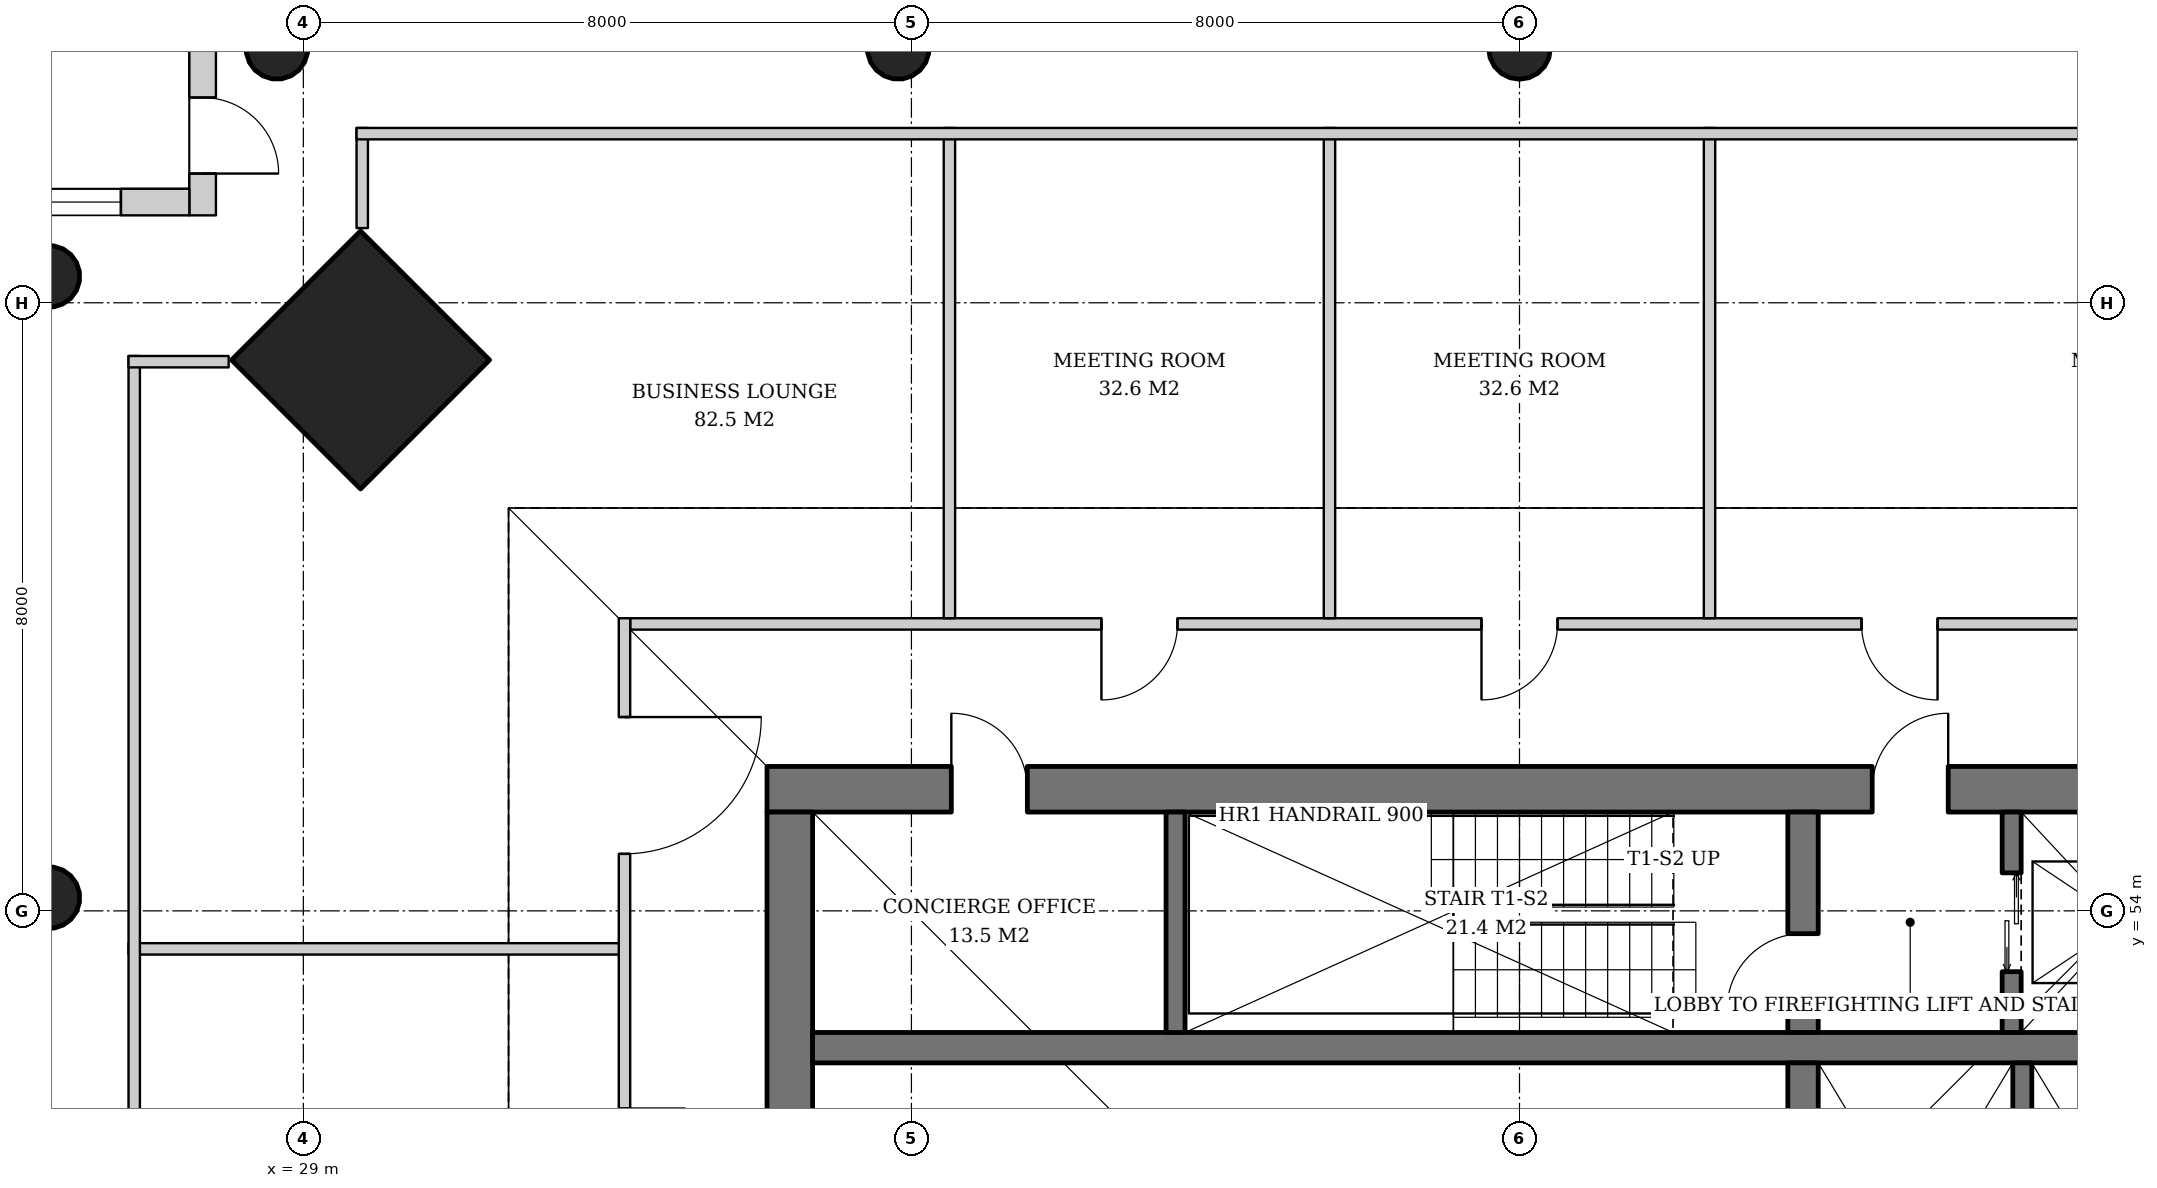
"""IFC4 building model, lengths in metres.
Left out: names, types, materials, properties, quantities, classifications, styles, units other than length and angle.
Written with IfcOpenShell. Run it as: python <this file> out.ifc"""

import sys

from ifc_helpers import new_model, si_unit, direction, frame, frame_2d, origin, origin_2d, place, context, subcontext, project, spatial, rectangle, hollow_circle, extrude, element, fill, save


model = new_model("IFC4")
c1 = context("Model", 3, precision=1e-05, world=origin(), true_north=direction((0.0, 1.0)))
c2 = subcontext(c1, "Body", "Model", "MODEL_VIEW")
j1 = project(units=[si_unit("LENGTHUNIT", "METRE"), si_unit("PLANEANGLEUNIT", "RADIAN")], contexts=[c1])
p1 = place(None, origin())
s1 = spatial("IfcSite", under=j1, at=p1, CompositionType="ELEMENT")
p2 = place(p1, origin())
s2 = spatial("IfcBuilding", under=s1, at=p2, CompositionType="ELEMENT")
p3 = place(p2, frame((0.0, 0.0, 165.4)))
s3 = spatial("IfcBuildingStorey", under=s2, at=p3, CompositionType="ELEMENT", Elevation=165.4)
p4 = place(p3, frame((29.714, 61.286, 0.0), z_axis=(0.031898107953, -0.031898107953, 0.998981992539), x_axis=(0.707106781187, 0.707106781187, 0.0)))
e1 = element("IfcColumn", 1, at=p4, inside=s3, PredefinedType="COLUMN", context=c2, shape_type="SweptSolid", body=[
    extrude(rectangle(XDim=2.4, YDim=2.4, at=origin_2d()), origin(), (0.0, 0.0, 1.0), 3.804),
])
p5 = place(p3, frame((28.614, 65.386, 0.0), z_axis=(0.031898107953, -0.031898107953, 0.998981992539), x_axis=(0.707106781187, 0.707106781187, 0.0)))
e2 = element("IfcColumn", 2, at=p5, inside=s3, PredefinedType="COLUMN", context=c2, shape_type="SweptSolid", body=[
    extrude(hollow_circle(Radius=0.406, WallThickness=0.03, at=origin_2d()), origin(), (0.0, 0.0, 1.0), 3.804),
])
p6 = place(p3, frame((45.0, 65.386, 0.0), z_axis=(0.0, -0.031914348339, 0.999490607445), x_axis=(1.0, 0.0, 0.0)))
e3 = element("IfcColumn", 3, at=p6, inside=s3, PredefinedType="COLUMN", context=c2, shape_type="SweptSolid", body=[
    extrude(hollow_circle(Radius=0.406, WallThickness=0.03, at=origin_2d()), origin(), (0.0, 0.0, 1.0), 3.802),
])
p7 = place(p3, frame((36.807, 65.386, 0.0), z_axis=(0.015987237665, -0.031910269556, 0.999362868496), x_axis=(0.894067115991, 0.447933021895, 0.0)))
e4 = element("IfcColumn", 4, at=p7, inside=s3, PredefinedType="COLUMN", context=c2, shape_type="SweptSolid", body=[
    extrude(hollow_circle(Radius=0.406, WallThickness=0.03, at=origin_2d()), origin(), (0.0, 0.0, 1.0), 3.802),
])
p8 = place(p3, frame((25.614, 62.386, 0.0), z_axis=(0.031898107953, -0.031898107953, 0.998981992539), x_axis=(0.707106781187, 0.707106781187, 0.0)))
e5 = element("IfcColumn", 5, at=p8, inside=s3, PredefinedType="COLUMN", context=c2, shape_type="SweptSolid", body=[
    extrude(hollow_circle(Radius=0.406, WallThickness=0.03, at=origin_2d()), origin(), (0.0, 0.0, 1.0), 3.804),
])
p9 = place(p3, frame((25.614, 54.193, 0.0), z_axis=(0.031910269556, -0.015987237665, 0.999362868496), x_axis=(0.447933021895, 0.894067115991, 0.0)))
e6 = element("IfcColumn", 6, at=p9, inside=s3, PredefinedType="COLUMN", context=c2, shape_type="SweptSolid", body=[
    extrude(hollow_circle(Radius=0.406, WallThickness=0.03, at=origin_2d()), origin(), (0.0, 0.0, 1.0), 3.802),
])
p10 = place(p3, frame((35.1, 55.6, 0.0), z_axis=(0.0, 0.0, 1.0), x_axis=(1.0, 0.0, 0.0)))
e7 = element("IfcWall", 7, at=p10, inside=s3, PredefinedType="SHEAR", context=c2, shape_type="SweptSolid", body=[
    extrude(rectangle(XDim=19.8, YDim=0.6, at=frame_2d((9.9, 0.0))), origin(), (0.0, 0.0, 1.0), 3.8),
])
p11 = place(p10, frame((14.54, 0.0, 0.0)))
e8 = element("IfcOpeningElement", 8, at=p11, cuts=e7, PredefinedType="OPENING", context=c2, shape_type="SweptSolid", body=[
    extrude(rectangle(XDim=1.0, YDim=2.1, at=frame_2d((0.5, 1.05))), frame((0.0, 0.31, 0.0), z_axis=(0.0, -1.0, 0.0), x_axis=(1.0, 0.0, 0.0)), (0.0, 0.0, 1.0), 0.62),
])
p12 = place(p10, frame((2.425, 0.0, 0.0)))
e9 = element("IfcOpeningElement", 9, at=p12, cuts=e7, PredefinedType="OPENING", context=c2, shape_type="SweptSolid", body=[
    extrude(rectangle(XDim=1.0, YDim=2.1, at=frame_2d((0.5, 1.05))), frame((0.0, 0.31, 0.0), z_axis=(0.0, -1.0, 0.0), x_axis=(1.0, 0.0, 0.0)), (0.0, 0.0, 1.0), 0.62),
])
p13 = place(p3, frame((35.4, 36.7, 0.0), z_axis=(0.0, 0.0, 1.0), x_axis=(0.0, 1.0, 0.0)))
e10 = element("IfcWall", 10, at=p13, inside=s3, PredefinedType="SHEAR", context=c2, shape_type="SweptSolid", body=[
    extrude(rectangle(XDim=18.6, YDim=0.6, at=frame_2d((9.3, 0.0))), origin(), (0.0, 0.0, 1.0), 3.8),
])
p14 = place(p13, frame((8.4, 0.0, 0.0)))
e11 = element("IfcOpeningElement", 11, at=p14, cuts=e10, PredefinedType="OPENING", context=c2, shape_type="SweptSolid", body=[
    extrude(rectangle(XDim=1.8, YDim=2.4, at=frame_2d((0.9, 1.2))), frame((0.0, 0.31, 0.0), z_axis=(0.0, -1.0, 0.0), x_axis=(1.0, 0.0, 0.0)), (0.0, 0.0, 1.0), 0.62),
])
p15 = place(p3, frame((35.7, 52.2, 0.0), z_axis=(0.0, 0.0, 1.0), x_axis=(1.0, 0.0, 0.0)))
e12 = element("IfcWall", 12, at=p15, inside=s3, PredefinedType="SHEAR", context=c2, shape_type="SweptSolid", body=[
    extrude(rectangle(XDim=18.6, YDim=0.4, at=frame_2d((9.3, 0.0))), origin(), (0.0, 0.0, 1.0), 3.8),
])
p16 = place(p3, frame((48.73, 40.0, 0.0), z_axis=(0.0, 0.0, 1.0), x_axis=(0.0, 1.0, 0.0)))
e13 = element("IfcWall", 13, at=p16, inside=s3, PredefinedType="SHEAR", context=c2, shape_type="SweptSolid", body=[
    extrude(rectangle(XDim=12.0, YDim=0.4, at=frame_2d((6.0, 0.0))), origin(), (0.0, 0.0, 1.0), 3.8),
])
p17 = place(p3, frame((48.73, 52.4, 0.0), z_axis=(0.0, 0.0, 1.0), x_axis=(0.0, 1.0, 0.0)))
e14 = element("IfcWall", 14, at=p17, inside=s3, PredefinedType="SHEAR", context=c2, shape_type="SweptSolid", body=[
    extrude(rectangle(XDim=2.9, YDim=0.4, at=frame_2d((1.45, 0.0))), origin(), (0.0, 0.0, 1.0), 3.8),
])
p18 = place(p17, frame((0.3, 0.0, 0.0)))
e15 = element("IfcOpeningElement", 15, at=p18, cuts=e14, PredefinedType="OPENING", context=c2, shape_type="SweptSolid", body=[
    extrude(rectangle(XDim=1.0, YDim=2.1, at=frame_2d((0.5, 1.05))), frame((0.0, 0.21, 0.0), z_axis=(0.0, -1.0, 0.0), x_axis=(1.0, 0.0, 0.0)), (0.0, 0.0, 1.0), 0.42),
])
p19 = place(p3, frame((27.675, 66.5, 0.0), z_axis=(0.0, 0.0, 1.0), x_axis=(0.0, -1.0, 0.0)))
e16 = element("IfcWall", 16, at=p19, inside=s3, PredefinedType="SOLIDWALL", context=c2, shape_type="SweptSolid", body=[
    extrude(rectangle(XDim=3.35, YDim=0.35, at=frame_2d((1.675, 0.0))), origin(), (0.0, 0.0, 1.0), 3.62),
])
p20 = place(p19, frame((1.8, 0.0, 0.0)))
e17 = element("IfcOpeningElement", 17, at=p20, cuts=e16, PredefinedType="OPENING", context=c2, shape_type="SweptSolid", body=[
    extrude(rectangle(XDim=1.0, YDim=2.4, at=frame_2d((0.5, 1.2))), frame((0.0, 0.185, 0.0), z_axis=(0.0, -1.0, 0.0), x_axis=(1.0, 0.0, 0.0)), (0.0, 0.0, 1.0), 0.37),
])
p21 = place(p3, frame((27.5, 63.325, 0.0), z_axis=(0.0, 0.0, 1.0), x_axis=(-1.0, 0.0, 0.0)))
e18 = element("IfcWall", 18, at=p21, inside=s3, PredefinedType="SOLIDWALL", context=c2, shape_type="SweptSolid", body=[
    extrude(rectangle(XDim=3.0, YDim=0.35, at=frame_2d((1.5, 0.0))), origin(), (0.0, 0.0, 1.0), 3.62),
])
p22 = place(p21, frame((0.9, 0.0, 0.6)))
e19 = element("IfcOpeningElement", 19, at=p22, cuts=e18, PredefinedType="OPENING", context=c2, shape_type="SweptSolid", body=[
    extrude(rectangle(XDim=1.2, YDim=2.55, at=frame_2d((0.6, 1.275))), frame((0.0, 0.185, 0.0), z_axis=(0.0, -1.0, 0.0), x_axis=(1.0, 0.0, 0.0)), (0.0, 0.0, 1.0), 0.37),
])
p23 = place(p3, frame((40.475, 52.4, 0.0), z_axis=(0.0, 0.0, 1.0), x_axis=(0.0, 1.0, 0.0)))
e20 = element("IfcWall", 20, at=p23, inside=s3, PredefinedType="SHEAR", context=c2, shape_type="SweptSolid", body=[
    extrude(rectangle(XDim=2.9, YDim=0.25, at=frame_2d((1.45, 0.0))), origin(), (0.0, 0.0, 1.0), 3.8),
])
p24 = place(p3, frame((51.475, 52.4, 0.0), z_axis=(0.0, 0.0, 1.0), x_axis=(0.0, 1.0, 0.0)))
e21 = element("IfcWall", 21, at=p24, inside=s3, PredefinedType="SHEAR", context=c2, shape_type="SweptSolid", body=[
    extrude(rectangle(XDim=2.9, YDim=0.25, at=frame_2d((1.45, 0.0))), origin(), (0.0, 0.0, 1.0), 3.8),
])
p25 = place(p24, frame((0.8, 0.0, 0.0)))
e22 = element("IfcOpeningElement", 22, at=p25, cuts=e21, PredefinedType="OPENING", context=c2, shape_type="SweptSolid", body=[
    extrude(rectangle(XDim=1.3, YDim=2.2, at=frame_2d((0.65, 1.1))), frame((0.0, 0.135, 0.0), z_axis=(0.0, -1.0, 0.0), x_axis=(1.0, 0.0, 0.0)), (0.0, 0.0, 1.0), 0.27),
])
p26 = place(p3, frame((51.615, 47.75, 0.0), z_axis=(0.0, 0.0, 1.0), x_axis=(0.0, 1.0, 0.0)))
e23 = element("IfcWall", 23, at=p26, inside=s3, PredefinedType="SHEAR", context=c2, shape_type="SweptSolid", body=[
    extrude(rectangle(XDim=4.25, YDim=0.25, at=frame_2d((2.125, 0.0))), origin(), (0.0, 0.0, 1.0), 3.8),
])
p27 = place(p3, frame((56.85, 57.775, 0.0), z_axis=(0.0, 0.0, 1.0), x_axis=(-1.0, 0.0, 0.0)))
e24 = element("IfcWall", 24, at=p27, inside=s3, PredefinedType="PARTITIONING", context=c2, shape_type="SweptSolid", body=[
    extrude(rectangle(XDim=23.55, YDim=0.15, at=frame_2d((11.775, 0.0))), origin(), (0.0, 0.0, 1.0), 2.85),
])
p28 = place(p27, frame((6.35, 0.0, 0.0)))
e25 = element("IfcOpeningElement", 25, at=p28, cuts=e24, PredefinedType="OPENING", context=c2, shape_type="SweptSolid", body=[
    extrude(rectangle(XDim=1.0, YDim=2.1, at=frame_2d((0.5, 1.05))), frame((0.0, 0.085, 0.0), z_axis=(0.0, -1.0, 0.0), x_axis=(1.0, 0.0, 0.0)), (0.0, 0.0, 1.0), 0.17),
])
p29 = place(p27, frame((11.35, 0.0, 0.0)))
e26 = element("IfcOpeningElement", 26, at=p29, cuts=e24, PredefinedType="OPENING", context=c2, shape_type="SweptSolid", body=[
    extrude(rectangle(XDim=1.0, YDim=2.1, at=frame_2d((0.5, 1.05))), frame((0.0, 0.085, 0.0), z_axis=(0.0, -1.0, 0.0), x_axis=(1.0, 0.0, 0.0)), (0.0, 0.0, 1.0), 0.17),
])
p30 = place(p27, frame((16.35, 0.0, 0.0)))
e27 = element("IfcOpeningElement", 27, at=p30, cuts=e24, PredefinedType="OPENING", context=c2, shape_type="SweptSolid", body=[
    extrude(rectangle(XDim=1.0, YDim=2.1, at=frame_2d((0.5, 1.05))), frame((0.0, 0.085, 0.0), z_axis=(0.0, -1.0, 0.0), x_axis=(1.0, 0.0, 0.0)), (0.0, 0.0, 1.0), 0.17),
])
for number, where, z_axis, x_axis in (
    (28, (47.5, 57.85, 0.0), (0.0, 0.0, 1.0), (0.0, 1.0, 0.0)),
    (29, (42.5, 57.85, 0.0), (0.0, 0.0, 1.0), (0.0, 1.0, 0.0)),
    (30, (37.5, 57.85, 0.0), (0.0, 0.0, 1.0), (0.0, 1.0, 0.0)),
):
    element("IfcWall", number, at=place(p3, frame(where, z_axis=z_axis, x_axis=x_axis)), inside=s3, PredefinedType="PARTITIONING", context=c2, shape_type="SweptSolid", body=[
        extrude(rectangle(XDim=6.45, YDim=0.15, at=frame_2d((3.225, 0.0))), origin(), (0.0, 0.0, 1.0), 3.62),
    ])
p31 = place(p3, frame((33.225, 57.85, 0.0), z_axis=(0.0, 0.0, 1.0), x_axis=(0.0, -1.0, 0.0)))
e31 = element("IfcWall", 31, at=p31, inside=s3, PredefinedType="PARTITIONING", context=c2, shape_type="SweptSolid", body=[
    extrude(rectangle(XDim=23.55, YDim=0.15, at=frame_2d((11.775, 0.0))), origin(), (0.0, 0.0, 1.0), 2.85),
])
p32 = place(p31, frame((6.45, 0.0, 0.0)))
e32 = element("IfcOpeningElement", 32, at=p32, cuts=e31, PredefinedType="OPENING", context=c2, shape_type="SweptSolid", body=[
    extrude(rectangle(XDim=0.8, YDim=2.1, at=frame_2d((0.4, 1.05))), frame((0.0, 0.085, 0.0), z_axis=(0.0, -1.0, 0.0), x_axis=(1.0, 0.0, 0.0)), (0.0, 0.0, 1.0), 0.17),
])
p33 = place(p31, frame((11.35, 0.0, 0.0)))
e33 = element("IfcOpeningElement", 33, at=p33, cuts=e31, PredefinedType="OPENING", context=c2, shape_type="SweptSolid", body=[
    extrude(rectangle(XDim=1.0, YDim=2.1, at=frame_2d((0.5, 1.05))), frame((0.0, 0.085, 0.0), z_axis=(0.0, -1.0, 0.0), x_axis=(1.0, 0.0, 0.0)), (0.0, 0.0, 1.0), 0.17),
])
p34 = place(p31, frame((16.45, 0.0, 0.0)))
e34 = element("IfcOpeningElement", 34, at=p34, cuts=e31, PredefinedType="OPENING", context=c2, shape_type="SweptSolid", body=[
    extrude(rectangle(XDim=0.8, YDim=2.1, at=frame_2d((0.4, 1.05))), frame((0.0, 0.085, 0.0), z_axis=(0.0, -1.0, 0.0), x_axis=(1.0, 0.0, 0.0)), (0.0, 0.0, 1.0), 0.17),
])
p35 = place(p31, frame((1.3, 0.0, 0.0)))
e35 = element("IfcOpeningElement", 35, at=p35, cuts=e31, PredefinedType="OPENING", context=c2, shape_type="SweptSolid", body=[
    extrude(rectangle(XDim=1.8, YDim=2.4, at=frame_2d((0.9, 1.2))), frame((0.0, 0.085, 0.0), z_axis=(0.0, -1.0, 0.0), x_axis=(1.0, 0.0, 0.0)), (0.0, 0.0, 1.0), 0.17),
])
p36 = place(p3, frame((33.15, 53.5, 0.0), z_axis=(0.0, 0.0, 1.0), x_axis=(-1.0, 0.0, 0.0)))
e36 = element("IfcWall", 36, at=p36, inside=s3, PredefinedType="PARTITIONING", context=c2, shape_type="SweptSolid", body=[
    extrude(rectangle(XDim=6.45, YDim=0.15, at=frame_2d((3.225, 0.0))), origin(), (0.0, 0.0, 1.0), 3.62),
])
p37 = place(p3, frame((26.775, 30.7, 0.0), z_axis=(0.0, 0.0, 1.0), x_axis=(0.0, 1.0, 0.0)))
e37 = element("IfcWall", 37, at=p37, inside=s3, PredefinedType="PARTITIONING", context=c2, shape_type="SweptSolid", body=[
    extrude(rectangle(XDim=30.6, YDim=0.15, at=frame_2d((15.3, 0.0))), origin(), (0.0, 0.0, 1.0), 2.85),
])
for number, where, z_axis, x_axis in (
    (38, (26.7, 61.225, 0.0), (0.0, 0.0, 1.0), (1.0, 0.0, 0.0)),
    (39, (29.775, 62.983, 0.0), (0.0, 0.0, 1.0), (0.0, 1.0, 0.0)),
):
    element("IfcWall", number, at=place(p3, frame(where, z_axis=z_axis, x_axis=x_axis)), inside=s3, PredefinedType="PARTITIONING", context=c2, shape_type="SweptSolid", body=[
        extrude(rectangle(XDim=1.317, YDim=0.15, at=frame_2d((0.659, 0.0))), origin(), (0.0, 0.0, 1.0), 3.62),
    ])
p38 = place(p3, frame((29.7, 64.225, 0.0), z_axis=(0.0, 0.0, 1.0), x_axis=(1.0, 0.0, 0.0)))
e40 = element("IfcWall", 40, at=p38, inside=s3, PredefinedType="PARTITIONING", context=c2, shape_type="SweptSolid", body=[
    extrude(rectangle(XDim=30.6, YDim=0.15, at=frame_2d((15.3, 0.0))), origin(), (0.0, 0.0, 1.0), 2.85),
])
p39 = place(p20, origin())
e41 = element("IfcDoor", 41, at=p39, inside=s3, OperationType="SINGLE_SWING_RIGHT", PredefinedType="DOOR", context=c2, shape_type="SweptSolid", body=[
    extrude(rectangle(XDim=1.0, YDim=2.4, at=frame_2d((0.5, 1.2))), frame((0.0, 0.025, 0.0), z_axis=(0.0, -1.0, 0.0), x_axis=(1.0, 0.0, 0.0)), (0.0, 0.0, 1.0), 0.05),
])
fill(e17, e41)
p40 = place(p22, origin())
e42 = element("IfcWindow", 42, at=p40, inside=s3, PartitioningType="SINGLE_PANEL", PredefinedType="WINDOW", context=c2, shape_type="SweptSolid", body=[
    extrude(rectangle(XDim=1.2, YDim=2.55, at=frame_2d((0.6, 1.275))), frame((0.0, 0.03, 0.0), z_axis=(0.0, -1.0, 0.0), x_axis=(1.0, 0.0, 0.0)), (0.0, 0.0, 1.0), 0.06),
])
fill(e19, e42)
p41 = place(p25, origin())
e43 = element("IfcDoor", 43, at=p41, inside=s3, OperationType="DOUBLE_DOOR_SLIDING", PredefinedType="DOOR", context=c2, shape_type="SweptSolid", body=[
    extrude(rectangle(XDim=1.3, YDim=2.2, at=frame_2d((0.65, 1.1))), frame((0.0, 0.025, 0.0), z_axis=(0.0, -1.0, 0.0), x_axis=(1.0, 0.0, 0.0)), (0.0, 0.0, 1.0), 0.05),
])
fill(e22, e43)
p42 = place(p18, origin())
e44 = element("IfcDoor", 44, at=p42, inside=s3, OperationType="SINGLE_SWING_LEFT", PredefinedType="DOOR", context=c2, shape_type="SweptSolid", body=[
    extrude(rectangle(XDim=1.0, YDim=2.1, at=frame_2d((0.5, 1.05))), frame((0.0, 0.025, 0.0), z_axis=(0.0, -1.0, 0.0), x_axis=(1.0, 0.0, 0.0)), (0.0, 0.0, 1.0), 0.05),
])
fill(e15, e44)
p43 = place(p11, origin())
e45 = element("IfcDoor", 45, at=p43, inside=s3, OperationType="SINGLE_SWING_RIGHT", PredefinedType="DOOR", context=c2, shape_type="SweptSolid", body=[
    extrude(rectangle(XDim=1.0, YDim=2.1, at=frame_2d((0.5, 1.05))), frame((0.0, 0.025, 0.0), z_axis=(0.0, -1.0, 0.0), x_axis=(1.0, 0.0, 0.0)), (0.0, 0.0, 1.0), 0.05),
])
fill(e8, e45)
p44 = place(p12, origin())
e46 = element("IfcDoor", 46, at=p44, inside=s3, OperationType="SINGLE_SWING_LEFT", PredefinedType="DOOR", context=c2, shape_type="SweptSolid", body=[
    extrude(rectangle(XDim=1.0, YDim=2.1, at=frame_2d((0.5, 1.05))), frame((0.0, -0.24, 0.0), z_axis=(0.0, -1.0, 0.0), x_axis=(1.0, 0.0, 0.0)), (0.0, 0.0, 1.0), 0.05),
])
fill(e9, e46)
p45 = place(p28, origin())
e47 = element("IfcDoor", 47, at=p45, inside=s3, OperationType="SINGLE_SWING_LEFT", PredefinedType="DOOR", context=c2, shape_type="SweptSolid", body=[
    extrude(rectangle(XDim=1.0, YDim=2.1, at=frame_2d((0.5, 1.05))), frame((0.0, 0.025, 0.0), z_axis=(0.0, -1.0, 0.0), x_axis=(1.0, 0.0, 0.0)), (0.0, 0.0, 1.0), 0.05),
])
fill(e25, e47)
p46 = place(p29, origin())
e48 = element("IfcDoor", 48, at=p46, inside=s3, OperationType="SINGLE_SWING_RIGHT", PredefinedType="DOOR", context=c2, shape_type="SweptSolid", body=[
    extrude(rectangle(XDim=1.0, YDim=2.1, at=frame_2d((0.5, 1.05))), frame((0.0, 0.025, 0.0), z_axis=(0.0, -1.0, 0.0), x_axis=(1.0, 0.0, 0.0)), (0.0, 0.0, 1.0), 0.05),
])
fill(e26, e48)
p47 = place(p30, origin())
e49 = element("IfcDoor", 49, at=p47, inside=s3, OperationType="SINGLE_SWING_RIGHT", PredefinedType="DOOR", context=c2, shape_type="SweptSolid", body=[
    extrude(rectangle(XDim=1.0, YDim=2.1, at=frame_2d((0.5, 1.05))), frame((0.0, 0.025, 0.0), z_axis=(0.0, -1.0, 0.0), x_axis=(1.0, 0.0, 0.0)), (0.0, 0.0, 1.0), 0.05),
])
fill(e27, e49)
p48 = place(p32, origin())
e50 = element("IfcDoor", 50, at=p48, inside=s3, OperationType="SINGLE_SWING_LEFT", PredefinedType="DOOR", context=c2, shape_type="SweptSolid", body=[
    extrude(rectangle(XDim=0.8, YDim=2.1, at=frame_2d((0.4, 1.05))), frame((0.0, 0.025, 0.0), z_axis=(0.0, -1.0, 0.0), x_axis=(1.0, 0.0, 0.0)), (0.0, 0.0, 1.0), 0.05),
])
fill(e32, e50)
p49 = place(p35, origin())
e51 = element("IfcDoor", 51, at=p49, inside=s3, OperationType="DOUBLE_DOOR_SINGLE_SWING", PredefinedType="DOOR", context=c2, shape_type="SweptSolid", body=[
    extrude(rectangle(XDim=1.8, YDim=2.4, at=frame_2d((0.9, 1.2))), frame((0.0, 0.025, 0.0), z_axis=(0.0, -1.0, 0.0), x_axis=(1.0, 0.0, 0.0)), (0.0, 0.0, 1.0), 0.05),
])
fill(e35, e51)
save(model, sys.argv[1])
